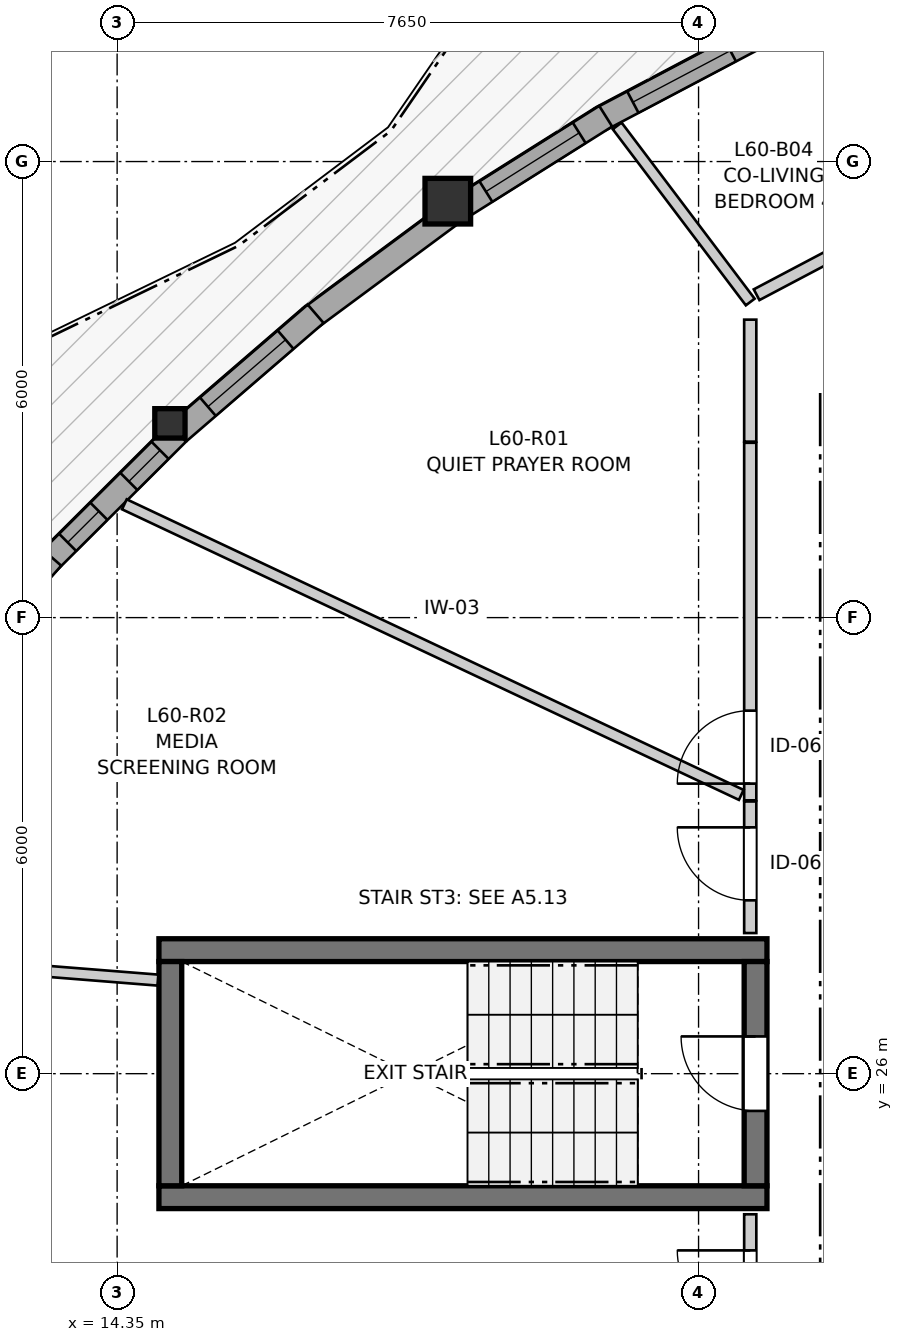
"""IFC4 building model, lengths in metres.
Left out: names, types, materials, properties, quantities, classifications, styles, units other than length and angle.
Written with IfcOpenShell. Run it as: python <this file> out.ifc"""

import sys

from ifc_helpers import new_model, si_unit, direction, frame, frame_2d, origin, origin_2d, place, context, subcontext, project, spatial, rectangle, i_section, extrude, source, transform, mapped, element, fill, save


model = new_model("IFC4")
c1 = context("Model", 3, precision=1e-05, world=origin(), true_north=direction((0.0, 1.0)))
c2 = subcontext(c1, "Body", "Model", "MODEL_VIEW")
j1 = project(units=[si_unit("LENGTHUNIT", "METRE"), si_unit("PLANEANGLEUNIT", "RADIAN")], contexts=[c1])
p1 = place(None, origin())
s1 = spatial("IfcSite", under=j1, at=p1, CompositionType="ELEMENT")
p2 = place(p1, origin())
s2 = spatial("IfcBuilding", under=s1, at=p2, CompositionType="ELEMENT")
p3 = place(p2, frame((0.0, 0.0, 202.0)))
s3 = spatial("IfcBuildingStorey", under=s2, at=p3, CompositionType="ELEMENT", Elevation=202.0)
for number, where, z_axis, x_axis in (
    (1, (14.9, 24.375, 0.0), (0.0, 0.0, 1.0), (1.0, 0.0, 0.0)),
    (2, (22.9, 27.625, 0.0), (0.0, 0.0, 1.0), (-1.0, 0.0, 0.0)),
):
    element("IfcWall", number, at=place(p3, frame(where, z_axis=z_axis, x_axis=x_axis)), inside=s3, PredefinedType="SHEAR", context=c2, shape_type="SweptSolid", body=[
        extrude(rectangle(XDim=8.0, YDim=0.3, at=frame_2d((4.0, 0.0))), origin(), (0.0, 0.0, 1.0), 2.935),
    ])
p4 = place(p3, frame((15.05, 27.475, 0.0), z_axis=(0.0, 0.0, 1.0), x_axis=(0.0, -1.0, 0.0)))
e3 = element("IfcWall", 3, at=p4, inside=s3, PredefinedType="SHEAR", context=c2, shape_type="SweptSolid", body=[
    extrude(rectangle(XDim=2.95, YDim=0.3, at=frame_2d((1.475, 0.0))), origin(), (0.0, 0.0, 1.0), 2.935),
])
p5 = place(p3, frame((22.75, 24.525, 0.0), z_axis=(0.0, 0.0, 1.0), x_axis=(0.0, 1.0, 0.0)))
e4 = element("IfcWall", 4, at=p5, inside=s3, PredefinedType="SHEAR", context=c2, shape_type="SweptSolid", body=[
    extrude(rectangle(XDim=2.95, YDim=0.3, at=frame_2d((1.475, 0.0))), origin(), (0.0, 0.0, 1.0), 2.935),
])
p6 = place(p5, frame((0.985, 0.0, 0.0)))
e5 = element("IfcOpeningElement", 5, at=p6, cuts=e4, PredefinedType="OPENING", context=c2, shape_type="SweptSolid", body=[
    extrude(rectangle(XDim=0.98, YDim=2.15, at=frame_2d((0.49, 1.075))), frame((0.0, 0.16, 0.0), z_axis=(0.0, -1.0, 0.0), x_axis=(1.0, 0.0, 0.0)), (0.0, 0.0, 1.0), 0.32),
])
m1 = source(origin(), c2, "Body", "SweptSolid", [
    extrude(rectangle(XDim=0.6, YDim=0.6, at=origin_2d()), origin(), (0.0, 0.0, 1.0), 2.935),
])
p7 = place(p3, frame((18.701, 37.479, 0.0), z_axis=(0.0, 0.0, 1.0), x_axis=(1.0, 0.0, 0.0)))
e6 = element("IfcColumn", 6, at=p7, inside=s3, PredefinedType="COLUMN", context=c2, shape_type="MappedRepresentation", body=[
    mapped(m1, transform((0.0, 0.0, 0.0), x_axis=(1.0, 0.0, 0.0), y_axis=(0.0, 1.0, 0.0), z_axis=(0.0, 0.0, 1.0), scale=1.0)),
])
m2 = source(origin(), c2, "Body", "SweptSolid", [
    extrude(i_section(OverallWidth=0.398, OverallDepth=0.387, WebThickness=0.019, FlangeThickness=0.03, FilletRadius=0.015, at=origin_2d()), origin(), (0.0, 0.0, 1.0), 2.935),
])
p8 = place(p3, frame((15.044, 34.555, 0.0), z_axis=(0.0, 0.0, 1.0), x_axis=(1.0, 0.0, 0.0)))
e7 = element("IfcColumn", 7, at=p8, inside=s3, PredefinedType="PILASTER", context=c2, shape_type="MappedRepresentation", body=[
    mapped(m2, transform((0.0, 0.0, 0.0), x_axis=(1.0, 0.0, 0.0), y_axis=(0.0, 1.0, 0.0), z_axis=(0.0, 0.0, 1.0), scale=1.0)),
])
p9 = place(p3, frame((22.766, 39.642, 0.0), z_axis=(0.0, 0.0, 1.0), x_axis=(-0.884377555637, -0.466772256122, 0.0)))
e8 = element("IfcWall", 8, at=p9, inside=s3, PredefinedType="SOLIDWALL", context=c2, shape_type="SweptSolid", body=[
    extrude(rectangle(XDim=2.334, YDim=0.32, at=frame_2d((1.167, 0.0))), origin(), (0.0, 0.0, 1.0), 2.555),
])
p10 = place(p9, frame((0.393, 0.0, 0.82)))
e9 = element("IfcOpeningElement", 9, at=p10, cuts=e8, PredefinedType="OPENING", context=c2, shape_type="SweptSolid", body=[
    extrude(rectangle(XDim=1.45, YDim=1.25, at=frame_2d((0.725, 0.625))), frame((0.0, 0.17, 0.0), z_axis=(0.0, -1.0, 0.0), x_axis=(1.0, 0.0, 0.0)), (0.0, 0.0, 1.0), 0.34),
])
p11 = place(p3, frame((20.778, 38.597, 0.0), z_axis=(0.0, 0.0, 1.0), x_axis=(-0.84639489148, -0.532555807101, 0.0)))
e10 = element("IfcWall", 10, at=p11, inside=s3, PredefinedType="SOLIDWALL", context=c2, shape_type="SweptSolid", body=[
    extrude(rectangle(XDim=2.264, YDim=0.32, at=frame_2d((1.132, 0.0))), origin(), (0.0, 0.0, 1.0), 2.555),
])
p12 = place(p11, frame((0.412, 0.0, 0.82)))
e11 = element("IfcOpeningElement", 11, at=p12, cuts=e10, PredefinedType="OPENING", context=c2, shape_type="SweptSolid", body=[
    extrude(rectangle(XDim=1.45, YDim=1.25, at=frame_2d((0.725, 0.625))), frame((0.0, 0.17, 0.0), z_axis=(0.0, -1.0, 0.0), x_axis=(1.0, 0.0, 0.0)), (0.0, 0.0, 1.0), 0.34),
])
p13 = place(p3, frame((18.724, 37.296, 0.0), z_axis=(0.0, 0.0, 1.0), x_axis=(-0.803830620004, -0.59485824727, 0.0)))
e12 = element("IfcWall", 12, at=p13, inside=s3, PredefinedType="SOLIDWALL", context=c2, shape_type="SweptSolid", body=[
    extrude(rectangle(XDim=2.277, YDim=0.32, at=frame_2d((1.139, 0.0))), origin(), (0.0, 0.0, 1.0), 2.555),
])
p14 = place(p3, frame((16.962, 35.997, 0.0), z_axis=(0.0, 0.0, 1.0), x_axis=(-0.757474860475, -0.652864331808, 0.0)))
e13 = element("IfcWall", 13, at=p14, inside=s3, PredefinedType="SOLIDWALL", context=c2, shape_type="SweptSolid", body=[
    extrude(rectangle(XDim=2.374, YDim=0.32, at=frame_2d((1.187, 0.0))), origin(), (0.0, 0.0, 1.0), 2.555),
])
p15 = place(p14, frame((0.522, 0.0, 0.82)))
e14 = element("IfcOpeningElement", 14, at=p15, cuts=e13, PredefinedType="OPENING", context=c2, shape_type="SweptSolid", body=[
    extrude(rectangle(XDim=1.35, YDim=1.45, at=frame_2d((0.675, 0.725))), frame((0.0, 0.17, 0.0), z_axis=(0.0, -1.0, 0.0), x_axis=(1.0, 0.0, 0.0)), (0.0, 0.0, 1.0), 0.34),
])
p16 = place(p3, frame((15.143, 34.428, 0.0), z_axis=(0.0, 0.0, 1.0), x_axis=(-0.708370597245, -0.705840702255, 0.0)))
e15 = element("IfcWall", 15, at=p16, inside=s3, PredefinedType="SOLIDWALL", context=c2, shape_type="SweptSolid", body=[
    extrude(rectangle(XDim=2.413, YDim=0.32, at=frame_2d((1.206, 0.0))), origin(), (0.0, 0.0, 1.0), 2.555),
])
p17 = place(p16, frame((0.322, 0.0, 0.82)))
e16 = element("IfcOpeningElement", 16, at=p17, cuts=e15, PredefinedType="OPENING", context=c2, shape_type="SweptSolid", body=[
    extrude(rectangle(XDim=0.58, YDim=1.35, at=frame_2d((0.29, 0.675))), frame((0.0, 0.17, 0.0), z_axis=(0.0, -1.0, 0.0), x_axis=(1.0, 0.0, 0.0)), (0.0, 0.0, 1.0), 0.34),
])
p18 = place(p16, frame((1.458, 0.0, 0.82)))
e17 = element("IfcOpeningElement", 17, at=p18, cuts=e15, PredefinedType="OPENING", context=c2, shape_type="SweptSolid", body=[
    extrude(rectangle(XDim=0.58, YDim=1.35, at=frame_2d((0.29, 0.675))), frame((0.0, 0.17, 0.0), z_axis=(0.0, -1.0, 0.0), x_axis=(1.0, 0.0, 0.0)), (0.0, 0.0, 1.0), 0.34),
])
p19 = place(p3, frame((13.494, 32.789, 0.0), z_axis=(0.0, 0.0, 1.0), x_axis=(-0.65765213646, -0.753321755566, 0.0)))
e18 = element("IfcWall", 18, at=p19, inside=s3, PredefinedType="SOLIDWALL", context=c2, shape_type="SweptSolid", body=[
    extrude(rectangle(XDim=2.394, YDim=0.32, at=frame_2d((1.197, 0.0))), origin(), (0.0, 0.0, 1.0), 2.555),
])
p20 = place(p19, frame((0.677, 0.0, 0.82)))
e19 = element("IfcOpeningElement", 19, at=p20, cuts=e18, PredefinedType="OPENING", context=c2, shape_type="SweptSolid", body=[
    extrude(rectangle(XDim=1.05, YDim=1.45, at=frame_2d((0.525, 0.725))), frame((0.0, 0.17, 0.0), z_axis=(0.0, -1.0, 0.0), x_axis=(1.0, 0.0, 0.0)), (0.0, 0.0, 1.0), 0.34),
])
p21 = place(p3, frame((22.68, 29.596, 0.0), z_axis=(0.0, 0.0, 1.0), x_axis=(0.0, 1.0, 0.0)))
e20 = element("IfcWall", 20, at=p21, inside=s3, PredefinedType="PARTITIONING", context=c2, shape_type="SweptSolid", body=[
    extrude(rectangle(XDim=4.704, YDim=0.16, at=frame_2d((2.352, 0.0))), origin(), (0.0, 0.0, 1.0), 2.935),
])
p22 = place(p21, frame((0.22, 0.0, 0.0)))
e21 = element("IfcOpeningElement", 21, at=p22, cuts=e20, PredefinedType="OPENING", context=c2, shape_type="SweptSolid", body=[
    extrude(rectangle(XDim=0.96, YDim=2.1, at=frame_2d((0.48, 1.05))), frame((0.0, 0.09, 0.0), z_axis=(0.0, -1.0, 0.0), x_axis=(1.0, 0.0, 0.0)), (0.0, 0.0, 1.0), 0.18),
])
p23 = place(p3, frame((22.68, 22.196, 0.0), z_axis=(0.0, 0.0, 1.0), x_axis=(0.0, 1.0, 0.0)))
e22 = element("IfcWall", 22, at=p23, inside=s3, PredefinedType="PARTITIONING", context=c2, shape_type="SweptSolid", body=[
    extrude(rectangle(XDim=1.954, YDim=0.16, at=frame_2d((0.977, 0.0))), origin(), (0.0, 0.0, 1.0), 2.935),
])
p24 = place(p23, frame((0.519, 0.0, 0.0)))
e23 = element("IfcOpeningElement", 23, at=p24, cuts=e22, PredefinedType="OPENING", context=c2, shape_type="SweptSolid", body=[
    extrude(rectangle(XDim=0.96, YDim=2.1, at=frame_2d((0.48, 1.05))), frame((0.0, 0.09, 0.0), z_axis=(0.0, -1.0, 0.0), x_axis=(1.0, 0.0, 0.0)), (0.0, 0.0, 1.0), 0.18),
])
p25 = place(p3, frame((22.68, 27.85, 0.0), z_axis=(0.0, 0.0, 1.0), x_axis=(0.0, 1.0, 0.0)))
e24 = element("IfcWall", 24, at=p25, inside=s3, PredefinedType="PARTITIONING", context=c2, shape_type="SweptSolid", body=[
    extrude(rectangle(XDim=1.731, YDim=0.16, at=frame_2d((0.865, 0.0))), origin(), (0.0, 0.0, 1.0), 2.935),
])
p26 = place(p25, frame((0.43, 0.0, 0.0)))
e25 = element("IfcOpeningElement", 25, at=p26, cuts=e24, PredefinedType="OPENING", context=c2, shape_type="SweptSolid", body=[
    extrude(rectangle(XDim=0.96, YDim=2.1, at=frame_2d((0.48, 1.05))), frame((0.0, 0.09, 0.0), z_axis=(0.0, -1.0, 0.0), x_axis=(1.0, 0.0, 0.0)), (0.0, 0.0, 1.0), 0.18),
])
p27 = place(p3, frame((14.445, 33.49, 0.0), z_axis=(0.0, 0.0, 1.0), x_axis=(0.904673727325, -0.426104971912, 0.0)))
e26 = element("IfcWall", 26, at=p27, inside=s3, PredefinedType="PARTITIONING", context=c2, shape_type="SweptSolid", body=[
    extrude(rectangle(XDim=8.972, YDim=0.145, at=frame_2d((4.486, 0.0))), origin(), (0.0, 0.0, 1.0), 2.935),
])
p28 = place(p3, frame((9.473, 27.661, 0.0), z_axis=(0.0, 0.0, 1.0), x_axis=(0.996864548282, -0.079126938392, 0.0)))
e27 = element("IfcWall", 27, at=p28, inside=s3, PredefinedType="PARTITIONING", context=c2, shape_type="SweptSolid", body=[
    extrude(rectangle(XDim=5.43, YDim=0.145, at=frame_2d((2.715, 0.0))), origin(), (0.0, 0.0, 1.0), 2.935),
])
p29 = place(p3, frame((20.929, 38.469, 0.0), z_axis=(0.0, 0.0, 1.0), x_axis=(0.602847358209, -0.797856542682, 0.0)))
e28 = element("IfcWall", 28, at=p29, inside=s3, PredefinedType="PARTITIONING", context=c2, shape_type="SweptSolid", body=[
    extrude(rectangle(XDim=2.905, YDim=0.145, at=frame_2d((1.452, 0.0))), origin(), (0.0, 0.0, 1.0), 2.935),
])
p30 = place(p3, frame((22.68, 34.315, 0.0), z_axis=(0.0, 0.0, 1.0), x_axis=(0.0, 1.0, 0.0)))
e29 = element("IfcWall", 29, at=p30, inside=s3, PredefinedType="PARTITIONING", context=c2, shape_type="SweptSolid", body=[
    extrude(rectangle(XDim=1.605, YDim=0.16, at=frame_2d((0.802, 0.0))), origin(), (0.0, 0.0, 1.0), 2.935),
])
p31 = place(p3, frame((22.764, 36.248, 0.0), z_axis=(0.0, 0.0, 1.0), x_axis=(0.884318813942, 0.466883535059, 0.0)))
e30 = element("IfcWall", 30, at=p31, inside=s3, PredefinedType="PARTITIONING", context=c2, shape_type="SweptSolid", body=[
    extrude(rectangle(XDim=1.486, YDim=0.16, at=frame_2d((0.743, 0.0))), origin(), (0.0, 0.0, 1.0), 2.935),
])
m3 = source(origin(), c2, "Body", "SweptSolid", [
    extrude(rectangle(XDim=1.45, YDim=1.25, at=frame_2d((0.725, 0.625))), frame((0.0, 0.03, 0.0), z_axis=(0.0, -1.0, 0.0), x_axis=(1.0, 0.0, 0.0)), (0.0, 0.0, 1.0), 0.06),
])
p32 = place(p10, origin())
e31 = element("IfcWindow", 31, at=p32, inside=s3, PartitioningType="SINGLE_PANEL", PredefinedType="WINDOW", context=c2, shape_type="MappedRepresentation", body=[
    mapped(m3, transform((0.0, 0.0, 0.0), x_axis=(1.0, 0.0, 0.0), y_axis=(0.0, 1.0, 0.0), z_axis=(0.0, 0.0, 1.0), scale=1.0)),
])
fill(e9, e31)
p33 = place(p12, origin())
e32 = element("IfcWindow", 32, at=p33, inside=s3, PartitioningType="SINGLE_PANEL", PredefinedType="WINDOW", context=c2, shape_type="MappedRepresentation", body=[
    mapped(m3, transform((0.0, 0.0, 0.0), x_axis=(1.0, 0.0, 0.0), y_axis=(0.0, 1.0, 0.0), z_axis=(0.0, 0.0, 1.0), scale=1.0)),
])
fill(e11, e32)
m4 = source(origin(), c2, "Body", "SweptSolid", [
    extrude(rectangle(XDim=1.35, YDim=1.45, at=frame_2d((0.675, 0.725))), frame((0.0, 0.03, 0.0), z_axis=(0.0, -1.0, 0.0), x_axis=(1.0, 0.0, 0.0)), (0.0, 0.0, 1.0), 0.06),
])
p34 = place(p15, origin())
e33 = element("IfcWindow", 33, at=p34, inside=s3, PartitioningType="SINGLE_PANEL", PredefinedType="WINDOW", context=c2, shape_type="MappedRepresentation", body=[
    mapped(m4, transform((0.0, 0.0, 0.0), x_axis=(1.0, 0.0, 0.0), y_axis=(0.0, 1.0, 0.0), z_axis=(0.0, 0.0, 1.0), scale=1.0)),
])
fill(e14, e33)
m5 = source(origin(), c2, "Body", "SweptSolid", [
    extrude(rectangle(XDim=0.58, YDim=1.35, at=frame_2d((0.29, 0.675))), frame((0.0, 0.03, 0.0), z_axis=(0.0, -1.0, 0.0), x_axis=(1.0, 0.0, 0.0)), (0.0, 0.0, 1.0), 0.06),
])
p35 = place(p17, origin())
e34 = element("IfcWindow", 34, at=p35, inside=s3, PartitioningType="SINGLE_PANEL", PredefinedType="WINDOW", context=c2, shape_type="MappedRepresentation", body=[
    mapped(m5, transform((0.0, 0.0, 0.0), x_axis=(1.0, 0.0, 0.0), y_axis=(0.0, 1.0, 0.0), z_axis=(0.0, 0.0, 1.0), scale=1.0)),
])
fill(e16, e34)
p36 = place(p18, origin())
e35 = element("IfcWindow", 35, at=p36, inside=s3, PartitioningType="SINGLE_PANEL", PredefinedType="WINDOW", context=c2, shape_type="MappedRepresentation", body=[
    mapped(m5, transform((0.0, 0.0, 0.0), x_axis=(1.0, 0.0, 0.0), y_axis=(0.0, 1.0, 0.0), z_axis=(0.0, 0.0, 1.0), scale=1.0)),
])
fill(e17, e35)
m6 = source(origin(), c2, "Body", "SweptSolid", [
    extrude(rectangle(XDim=0.98, YDim=2.15, at=frame_2d((0.49, 1.075))), frame((0.0, 0.025, 0.0), z_axis=(0.0, -1.0, 0.0), x_axis=(1.0, 0.0, 0.0)), (0.0, 0.0, 1.0), 0.05),
])
p37 = place(p6, origin())
e36 = element("IfcDoor", 36, at=p37, inside=s3, OperationType="SINGLE_SWING_RIGHT", PredefinedType="DOOR", context=c2, shape_type="MappedRepresentation", body=[
    mapped(m6, transform((0.0, 0.0, 0.0), x_axis=(1.0, 0.0, 0.0), y_axis=(0.0, 1.0, 0.0), z_axis=(0.0, 0.0, 1.0), scale=1.0)),
])
fill(e5, e36)
m7 = source(origin(), c2, "Body", "SweptSolid", [
    extrude(rectangle(XDim=0.96, YDim=2.1, at=frame_2d((0.48, 1.05))), frame((0.0, 0.025, 0.0), z_axis=(0.0, -1.0, 0.0), x_axis=(1.0, 0.0, 0.0)), (0.0, 0.0, 1.0), 0.05),
])
p38 = place(p22, origin())
e37 = element("IfcDoor", 37, at=p38, inside=s3, OperationType="SINGLE_SWING_LEFT", PredefinedType="DOOR", context=c2, shape_type="MappedRepresentation", body=[
    mapped(m7, transform((0.0, 0.0, 0.0), x_axis=(1.0, 0.0, 0.0), y_axis=(0.0, 1.0, 0.0), z_axis=(0.0, 0.0, 1.0), scale=1.0)),
])
fill(e21, e37)
p39 = place(p24, origin())
e38 = element("IfcDoor", 38, at=p39, inside=s3, OperationType="SINGLE_SWING_RIGHT", PredefinedType="DOOR", context=c2, shape_type="MappedRepresentation", body=[
    mapped(m7, transform((0.0, 0.0, 0.0), x_axis=(1.0, 0.0, 0.0), y_axis=(0.0, 1.0, 0.0), z_axis=(0.0, 0.0, 1.0), scale=1.0)),
])
fill(e23, e38)
p40 = place(p26, origin())
e39 = element("IfcDoor", 39, at=p40, inside=s3, OperationType="SINGLE_SWING_RIGHT", PredefinedType="DOOR", context=c2, shape_type="MappedRepresentation", body=[
    mapped(m7, transform((0.0, 0.0, 0.0), x_axis=(1.0, 0.0, 0.0), y_axis=(0.0, 1.0, 0.0), z_axis=(0.0, 0.0, 1.0), scale=1.0)),
])
fill(e25, e39)
save(model, sys.argv[1])
